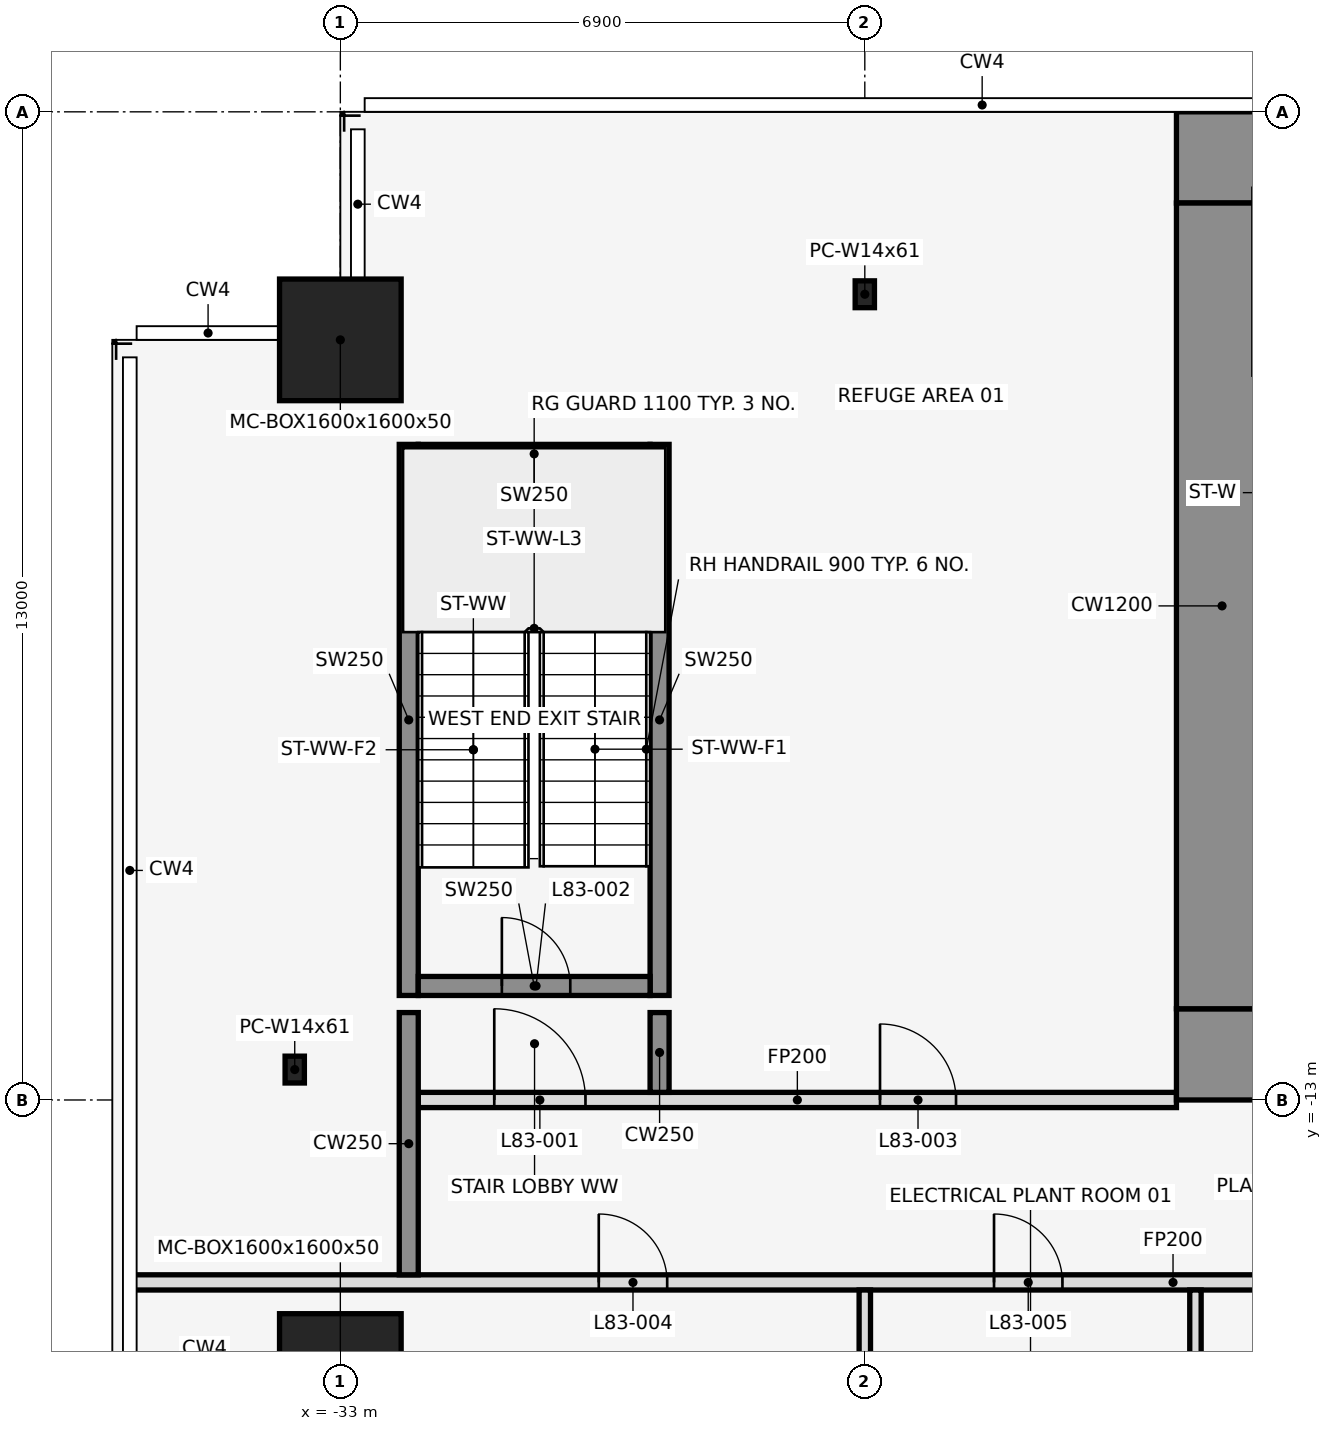
"""IFC4 building model, lengths in metres.
Left out: names, types, materials, properties, quantities, classifications, styles, units other than length and angle.
Written with IfcOpenShell. Run it as: python <this file> out.ifc"""

import sys

from ifc_helpers import new_model, si_unit, direction, frame, frame_2d, origin, origin_2d, place, context, subcontext, project, spatial, rectangle, hollow_rectangle, i_section, extrude, element, fill, save


model = new_model("IFC4")
c1 = context("Model", 3, precision=1e-05, world=origin(), true_north=direction((0.0, 1.0)))
c2 = subcontext(c1, "Body", "Model", "MODEL_VIEW")
j1 = project(units=[si_unit("LENGTHUNIT", "METRE"), si_unit("PLANEANGLEUNIT", "RADIAN")], contexts=[c1])
p1 = place(None, origin())
s1 = spatial("IfcSite", under=j1, at=p1, CompositionType="ELEMENT")
p2 = place(p1, origin())
s2 = spatial("IfcBuilding", under=s1, at=p2, CompositionType="ELEMENT")
p3 = place(p2, frame((0.0, 0.0, 370.4)))
s3 = spatial("IfcBuildingStorey", under=s2, at=p3, CompositionType="ELEMENT", Elevation=370.4)
for number, where, z_axis, x_axis in (
    (1, (-33.0, -16.612, 0.0), (0.0, 0.0, 1.0), (1.0, 0.0, 0.0)),
    (2, (-33.0, -3.0, 0.0), (0.0, 0.0, 1.0), (1.0, 0.0, 0.0)),
):
    element("IfcColumn", number, at=place(p3, frame(where, z_axis=z_axis, x_axis=x_axis)), inside=s3, PredefinedType="COLUMN", context=c2, shape_type="SweptSolid", body=[
        extrude(hollow_rectangle(XDim=1.6, YDim=1.6, WallThickness=0.05, at=origin_2d()), origin(), (0.0, 0.0, 1.0), 4.5),
    ])
for number, where, z_axis, x_axis in (
    (3, (-26.1, -2.4, 0.0), (0.0, 0.0, 1.0), (1.0, 0.0, 0.0)),
    (4, (-33.6, -12.6, 0.0), (0.0, 0.0, 1.0), (1.0, 0.0, 0.0)),
):
    element("IfcColumn", number, at=place(p3, frame(where, z_axis=z_axis, x_axis=x_axis)), inside=s3, PredefinedType="COLUMN", context=c2, shape_type="SweptSolid", body=[
        extrude(i_section(OverallWidth=0.254, OverallDepth=0.353, WebThickness=0.01, FlangeThickness=0.016, at=origin_2d()), origin(), (0.0, 0.0, 1.0), 4.5),
    ])
for number, where, z_axis, x_axis in (
    (5, (-32.1, -11.625, 0.0), (0.0, 0.0, 1.0), (0.0, 1.0, 0.0)),
    (6, (-28.8, -11.625, 0.0), (0.0, 0.0, 1.0), (0.0, 1.0, 0.0)),
):
    element("IfcWall", number, at=place(p3, frame(where, z_axis=z_axis, x_axis=x_axis)), inside=s3, PredefinedType="SHEAR", context=c2, shape_type="SweptSolid", body=[
        extrude(rectangle(XDim=7.25, YDim=0.25, at=frame_2d((3.625, 0.0))), origin(), (0.0, 0.0, 1.0), 4.5),
    ])
p4 = place(p3, frame((-31.975, -11.5, 0.0), z_axis=(0.0, 0.0, 1.0), x_axis=(1.0, 0.0, 0.0)))
e7 = element("IfcWall", 7, at=p4, inside=s3, PredefinedType="SHEAR", context=c2, shape_type="SweptSolid", body=[
    extrude(rectangle(XDim=3.05, YDim=0.25, at=frame_2d((1.525, 0.0))), origin(), (0.0, 0.0, 1.0), 4.5),
])
p5 = place(p4, frame((1.1, 0.0, 0.0)))
e8 = element("IfcOpeningElement", 8, at=p5, cuts=e7, PredefinedType="OPENING", context=c2, shape_type="SweptSolid", body=[
    extrude(rectangle(XDim=0.9, YDim=2.1, at=frame_2d((0.45, 1.05))), frame((0.0, 0.137, 0.0), z_axis=(0.0, -1.0, 0.0), x_axis=(1.0, 0.0, 0.0)), (0.0, 0.0, 1.0), 0.274),
])
p6 = place(p3, frame((-31.975, -4.5, 0.0), z_axis=(0.0, 0.0, 1.0), x_axis=(1.0, 0.0, 0.0)))
e9 = element("IfcWall", 9, at=p6, inside=s3, PredefinedType="SHEAR", context=c2, shape_type="SweptSolid", body=[
    extrude(rectangle(XDim=3.05, YDim=0.25, at=frame_2d((1.525, 0.0))), origin(), (0.0, 0.0, 1.0), 4.5),
])
p7 = place(p3, frame((-35.79, -15.4, 0.0), z_axis=(0.0, 0.0, 1.0), x_axis=(1.0, 0.0, 0.0)))
e10 = element("IfcWall", 10, at=p7, inside=s3, PredefinedType="PARTITIONING", context=c2, shape_type="SweptSolid", body=[
    extrude(rectangle(XDim=27.49, YDim=0.2, at=frame_2d((13.745, 0.0))), origin(), (0.0, 0.0, 1.0), 3.368),
])
p8 = place(p7, frame((6.19, 0.0, 0.0)))
e11 = element("IfcOpeningElement", 11, at=p8, cuts=e10, PredefinedType="OPENING", context=c2, shape_type="SweptSolid", body=[
    extrude(rectangle(XDim=0.9, YDim=2.1, at=frame_2d((0.45, 1.05))), frame((0.0, 0.112, 0.0), z_axis=(0.0, -1.0, 0.0), x_axis=(1.0, 0.0, 0.0)), (0.0, 0.0, 1.0), 0.224),
])
p9 = place(p7, frame((11.39, 0.0, 0.0)))
e12 = element("IfcOpeningElement", 12, at=p9, cuts=e10, PredefinedType="OPENING", context=c2, shape_type="SweptSolid", body=[
    extrude(rectangle(XDim=0.9, YDim=2.1, at=frame_2d((0.45, 1.05))), frame((0.0, 0.112, 0.0), z_axis=(0.0, -1.0, 0.0), x_axis=(1.0, 0.0, 0.0)), (0.0, 0.0, 1.0), 0.224),
])
p10 = place(p7, frame((19.24, 0.0, 0.0)))
e13 = element("IfcOpeningElement", 13, at=p10, cuts=e10, PredefinedType="OPENING", context=c2, shape_type="SweptSolid", body=[
    extrude(rectangle(XDim=1.0, YDim=2.1, at=frame_2d((0.5, 1.05))), frame((0.0, 0.112, 0.0), z_axis=(0.0, -1.0, 0.0), x_axis=(1.0, 0.0, 0.0)), (0.0, 0.0, 1.0), 0.224),
])
p11 = place(p3, frame((-31.975, -13.0, 0.0), z_axis=(0.0, 0.0, 1.0), x_axis=(1.0, 0.0, 0.0)))
e14 = element("IfcWall", 14, at=p11, inside=s3, PredefinedType="PARTITIONING", context=c2, shape_type="SweptSolid", body=[
    extrude(rectangle(XDim=9.975, YDim=0.2, at=frame_2d((4.988, 0.0))), origin(), (0.0, 0.0, 1.0), 3.368),
])
p12 = place(p11, frame((1.0, 0.0, 0.0)))
e15 = element("IfcOpeningElement", 15, at=p12, cuts=e14, PredefinedType="OPENING", context=c2, shape_type="SweptSolid", body=[
    extrude(rectangle(XDim=1.2, YDim=2.1, at=frame_2d((0.6, 1.05))), frame((0.0, 0.112, 0.0), z_axis=(0.0, -1.0, 0.0), x_axis=(1.0, 0.0, 0.0)), (0.0, 0.0, 1.0), 0.224),
])
p13 = place(p11, frame((6.075, 0.0, 0.0)))
e16 = element("IfcOpeningElement", 16, at=p13, cuts=e14, PredefinedType="OPENING", context=c2, shape_type="SweptSolid", body=[
    extrude(rectangle(XDim=1.0, YDim=2.1, at=frame_2d((0.5, 1.05))), frame((0.0, 0.112, 0.0), z_axis=(0.0, -1.0, 0.0), x_axis=(1.0, 0.0, 0.0)), (0.0, 0.0, 1.0), 0.224),
])
p14 = place(p3, frame((-32.1, -15.3, 0.0), z_axis=(0.0, 0.0, 1.0), x_axis=(0.0, 1.0, 0.0)))
e17 = element("IfcWall", 17, at=p14, inside=s3, PredefinedType="SHEAR", context=c2, shape_type="SweptSolid", body=[
    extrude(rectangle(XDim=3.45, YDim=0.25, at=frame_2d((1.725, 0.0))), origin(), (0.0, 0.0, 1.0), 4.5),
])
p15 = place(p3, frame((-28.8, -12.9, 0.0), z_axis=(0.0, 0.0, 1.0), x_axis=(0.0, 1.0, 0.0)))
e18 = element("IfcWall", 18, at=p15, inside=s3, PredefinedType="SHEAR", context=c2, shape_type="SweptSolid", body=[
    extrude(rectangle(XDim=1.05, YDim=0.25, at=frame_2d((0.525, 0.0))), origin(), (0.0, 0.0, 1.0), 4.5),
])
for number, where, z_axis, x_axis in (
    (19, (-26.1, -19.84, 0.0), (0.0, 0.0, 1.0), (0.0, 1.0, 0.0)),
    (20, (-21.75, -19.84, 0.0), (0.0, 0.0, 1.0), (0.0, 1.0, 0.0)),
):
    element("IfcWall", number, at=place(p3, frame(where, z_axis=z_axis, x_axis=x_axis)), inside=s3, PredefinedType="PARTITIONING", context=c2, shape_type="SweptSolid", body=[
        extrude(rectangle(XDim=4.34, YDim=0.15, at=frame_2d((2.17, 0.0))), origin(), (0.0, 0.0, 1.0), 3.368),
    ])
p16 = place(p3, frame((-22.0, -0.6, 0.0), z_axis=(0.0, 0.0, 1.0), x_axis=(1.0, 0.0, 0.0)))
e21 = element("IfcWall", 21, at=p16, inside=s3, PredefinedType="SHEAR", context=c2, shape_type="SweptSolid", body=[
    extrude(rectangle(XDim=13.7, YDim=1.2, at=frame_2d((6.85, 0.0))), origin(), (0.0, 0.0, 1.0), 4.5),
])
p17 = place(p3, frame((-22.0, -12.4, 0.0), z_axis=(0.0, 0.0, 1.0), x_axis=(1.0, 0.0, 0.0)))
e22 = element("IfcWall", 22, at=p17, inside=s3, PredefinedType="SHEAR", context=c2, shape_type="SweptSolid", body=[
    extrude(rectangle(XDim=13.7, YDim=1.2, at=frame_2d((6.85, 0.0))), origin(), (0.0, 0.0, 1.0), 4.5),
])
p18 = place(p17, frame((2.2, 0.0, 0.0)))
e23 = element("IfcOpeningElement", 23, at=p18, cuts=e22, PredefinedType="OPENING", context=c2, shape_type="SweptSolid", body=[
    extrude(rectangle(XDim=1.2, YDim=2.1, at=frame_2d((0.6, 1.05))), frame((0.0, 0.612, 0.0), z_axis=(0.0, -1.0, 0.0), x_axis=(1.0, 0.0, 0.0)), (0.0, 0.0, 1.0), 1.224),
])
p19 = place(p17, frame((10.75, 0.0, 0.0)))
e24 = element("IfcOpeningElement", 24, at=p19, cuts=e22, PredefinedType="OPENING", context=c2, shape_type="SweptSolid", body=[
    extrude(rectangle(XDim=1.2, YDim=2.1, at=frame_2d((0.6, 1.05))), frame((0.0, 0.612, 0.0), z_axis=(0.0, -1.0, 0.0), x_axis=(1.0, 0.0, 0.0)), (0.0, 0.0, 1.0), 1.224),
])
p20 = place(p17, frame((6.3, 0.0, 0.0)))
e25 = element("IfcOpeningElement", 25, at=p20, cuts=e22, PredefinedType="OPENING", context=c2, shape_type="SweptSolid", body=[
    extrude(rectangle(XDim=1.2, YDim=2.1, at=frame_2d((0.6, 1.05))), frame((0.0, 0.612, 0.0), z_axis=(0.0, -1.0, 0.0), x_axis=(1.0, 0.0, 0.0)), (0.0, 0.0, 1.0), 1.224),
])
p21 = place(p3, frame((-21.4, -11.8, 0.0), z_axis=(0.0, 0.0, 1.0), x_axis=(0.0, 1.0, 0.0)))
e26 = element("IfcWall", 26, at=p21, inside=s3, PredefinedType="SHEAR", context=c2, shape_type="SweptSolid", body=[
    extrude(rectangle(XDim=10.6, YDim=1.2, at=frame_2d((5.3, 0.0))), origin(), (0.0, 0.0, 1.0), 4.5),
])
p22 = place(p12, origin())
e27 = element("IfcDoor", 27, at=p22, inside=s3, OperationType="SINGLE_SWING_LEFT", PredefinedType="DOOR", context=c2, shape_type="SweptSolid", body=[
    extrude(rectangle(XDim=1.2, YDim=2.1, at=frame_2d((0.6, 1.05))), frame((0.0, 0.025, 0.0), z_axis=(0.0, -1.0, 0.0), x_axis=(1.0, 0.0, 0.0)), (0.0, 0.0, 1.0), 0.05),
])
fill(e15, e27)
p23 = place(p5, origin())
e28 = element("IfcDoor", 28, at=p23, inside=s3, OperationType="SINGLE_SWING_LEFT", PredefinedType="DOOR", context=c2, shape_type="SweptSolid", body=[
    extrude(rectangle(XDim=0.9, YDim=2.1, at=frame_2d((0.45, 1.05))), frame((0.0, 0.025, 0.0), z_axis=(0.0, -1.0, 0.0), x_axis=(1.0, 0.0, 0.0)), (0.0, 0.0, 1.0), 0.05),
])
fill(e8, e28)
p24 = place(p13, origin())
e29 = element("IfcDoor", 29, at=p24, inside=s3, OperationType="SINGLE_SWING_RIGHT", PredefinedType="DOOR", context=c2, shape_type="SweptSolid", body=[
    extrude(rectangle(XDim=1.0, YDim=2.1, at=frame_2d((0.5, 1.05))), frame((0.0, 0.025, 0.0), z_axis=(0.0, -1.0, 0.0), x_axis=(1.0, 0.0, 0.0)), (0.0, 0.0, 1.0), 0.05),
])
fill(e16, e29)
p25 = place(p8, frame((0.9, 0.0, 0.0), z_axis=(0.0, 0.0, 1.0), x_axis=(-1.0, 0.0, 0.0)))
e30 = element("IfcDoor", 30, at=p25, inside=s3, OperationType="SINGLE_SWING_LEFT", PredefinedType="DOOR", context=c2, shape_type="SweptSolid", body=[
    extrude(rectangle(XDim=0.9, YDim=2.1, at=frame_2d((0.45, 1.05))), frame((0.0, 0.025, 0.0), z_axis=(0.0, -1.0, 0.0), x_axis=(1.0, 0.0, 0.0)), (0.0, 0.0, 1.0), 0.05),
])
fill(e11, e30)
p26 = place(p9, frame((0.9, 0.0, 0.0), z_axis=(0.0, 0.0, 1.0), x_axis=(-1.0, 0.0, 0.0)))
e31 = element("IfcDoor", 31, at=p26, inside=s3, OperationType="SINGLE_SWING_RIGHT", PredefinedType="DOOR", context=c2, shape_type="SweptSolid", body=[
    extrude(rectangle(XDim=0.9, YDim=2.1, at=frame_2d((0.45, 1.05))), frame((0.0, 0.025, 0.0), z_axis=(0.0, -1.0, 0.0), x_axis=(1.0, 0.0, 0.0)), (0.0, 0.0, 1.0), 0.05),
])
fill(e12, e31)
save(model, sys.argv[1])
